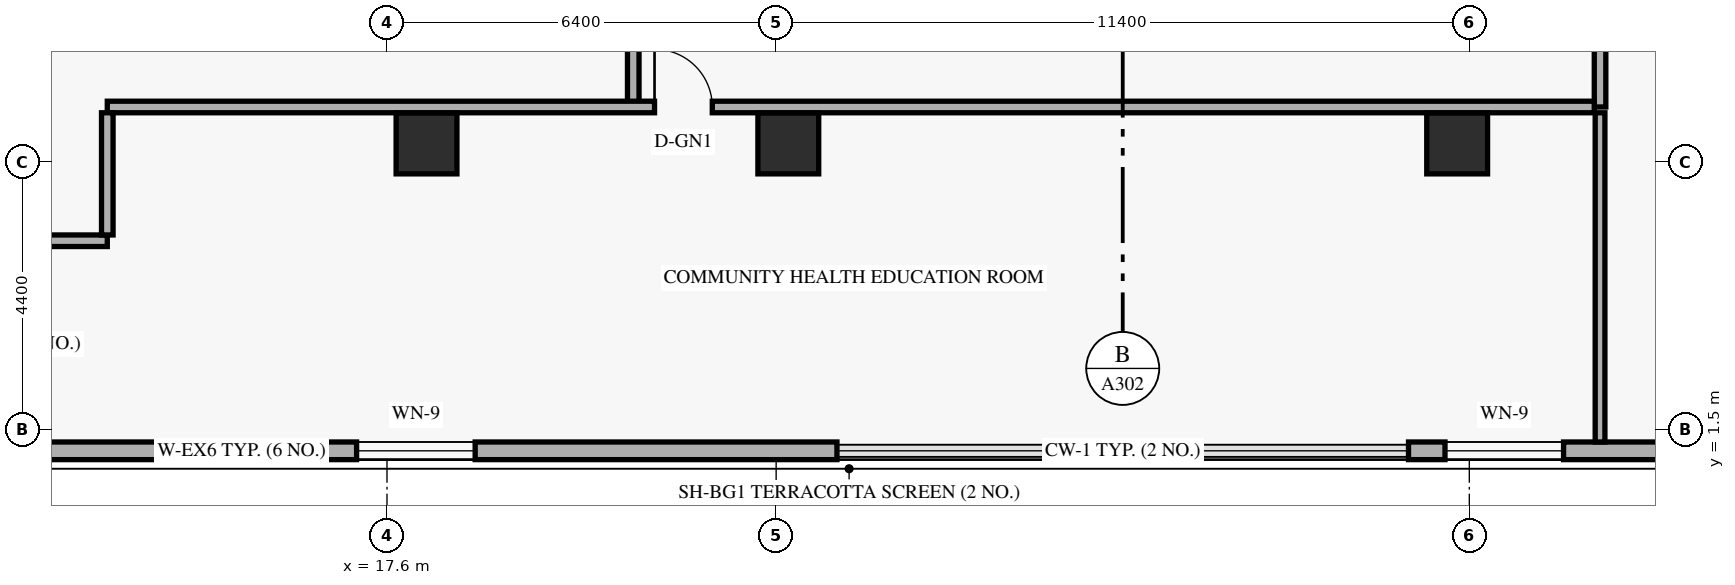
"""IFC4 building model, lengths in metres.
Left out: names, types, materials, properties, quantities, classifications, styles, units other than length and angle.
Written with IfcOpenShell. Run it as: python <this file> out.ifc"""

import sys

from ifc_helpers import new_model, si_unit, direction, frame, frame_2d, origin, origin_2d, place, context, subcontext, project, spatial, rectangle, extrude, element, fill, save


model = new_model("IFC4")
c1 = context("Model", 3, precision=1e-05, world=origin(), true_north=direction((0.0, 1.0)))
c2 = subcontext(c1, "Body", "Model", "MODEL_VIEW")
j1 = project(units=[si_unit("LENGTHUNIT", "METRE"), si_unit("PLANEANGLEUNIT", "RADIAN")], contexts=[c1])
p1 = place(None, origin())
s1 = spatial("IfcSite", under=j1, at=p1, CompositionType="ELEMENT")
p2 = place(p1, origin())
s2 = spatial("IfcBuilding", under=s1, at=p2, CompositionType="ELEMENT")
p3 = place(p2, frame((0.0, 0.0, 19.2)))
s3 = spatial("IfcBuildingStorey", under=s2, at=p3, CompositionType="ELEMENT", Elevation=19.2)
for number, where, z_axis, x_axis in (
    (1, (18.25, 6.2, 0.0), (0.0, 0.0, 1.0), (1.0, 0.0, 0.0)),
    (2, (24.2, 6.2, 0.0), (0.0, 0.0, 1.0), (1.0, 0.0, 0.0)),
    (3, (35.2, 6.2, 0.0), (0.0, 0.0, 1.0), (1.0, 0.0, 0.0)),
):
    element("IfcColumn", number, at=place(p3, frame(where, z_axis=z_axis, x_axis=x_axis)), inside=s3, PredefinedType="COLUMN", context=c2, shape_type="SweptSolid", body=[
        extrude(rectangle(XDim=1.0, YDim=1.0, at=origin_2d()), origin(), (0.0, 0.0, 1.0), 4.8),
    ])
p4 = place(p3, frame((5.42, 1.145, 0.0), z_axis=(0.0, 0.0, 1.0), x_axis=(1.0, 0.0, 0.0)))
e4 = element("IfcWall", 4, at=p4, inside=s3, PredefinedType="SOLIDWALL", context=c2, shape_type="SweptSolid", body=[
    extrude(rectangle(XDim=19.58, YDim=0.29, at=frame_2d((9.79, 0.0))), origin(), (0.0, 0.0, 1.0), 4.5),
])
p5 = place(p4, frame((1.89, 0.0, 0.85)))
e5 = element("IfcOpeningElement", 5, at=p5, cuts=e4, PredefinedType="OPENING", context=c2, shape_type="SweptSolid", body=[
    extrude(rectangle(XDim=1.95, YDim=1.75, at=frame_2d((0.975, 0.875))), frame((0.0, 0.155, 0.0), z_axis=(0.0, -1.0, 0.0), x_axis=(1.0, 0.0, 0.0)), (0.0, 0.0, 1.0), 0.31),
])
p6 = place(p4, frame((11.68, 0.0, 0.85)))
e6 = element("IfcOpeningElement", 6, at=p6, cuts=e4, PredefinedType="OPENING", context=c2, shape_type="SweptSolid", body=[
    extrude(rectangle(XDim=1.95, YDim=1.75, at=frame_2d((0.975, 0.875))), frame((0.0, 0.155, 0.0), z_axis=(0.0, -1.0, 0.0), x_axis=(1.0, 0.0, 0.0)), (0.0, 0.0, 1.0), 0.31),
])
p7 = place(p3, frame((34.4, 1.145, 0.0), z_axis=(0.0, 0.0, 1.0), x_axis=(1.0, 0.0, 0.0)))
e7 = element("IfcWall", 7, at=p7, inside=s3, PredefinedType="SOLIDWALL", context=c2, shape_type="SweptSolid", body=[
    extrude(rectangle(XDim=10.58, YDim=0.29, at=frame_2d((5.29, 0.0))), origin(), (0.0, 0.0, 1.0), 4.5),
])
p8 = place(p7, frame((0.6, 0.0, 0.85)))
e8 = element("IfcOpeningElement", 8, at=p8, cuts=e7, PredefinedType="OPENING", context=c2, shape_type="SweptSolid", body=[
    extrude(rectangle(XDim=1.95, YDim=1.75, at=frame_2d((0.975, 0.875))), frame((0.0, 0.155, 0.0), z_axis=(0.0, -1.0, 0.0), x_axis=(1.0, 0.0, 0.0)), (0.0, 0.0, 1.0), 0.31),
])
p9 = place(p7, frame((5.89, 0.0, 0.85)))
e9 = element("IfcOpeningElement", 9, at=p9, cuts=e7, PredefinedType="OPENING", context=c2, shape_type="SweptSolid", body=[
    extrude(rectangle(XDim=1.95, YDim=1.75, at=frame_2d((0.975, 0.875))), frame((0.0, 0.155, 0.0), z_axis=(0.0, -1.0, 0.0), x_axis=(1.0, 0.0, 0.0)), (0.0, 0.0, 1.0), 0.31),
])
p10 = place(p3, frame((21.65, 6.8, 0.0), z_axis=(0.0, 0.0, 1.0), x_axis=(0.0, 1.0, 0.0)))
e10 = element("IfcWall", 10, at=p10, inside=s3, PredefinedType="STANDARD", context=c2, shape_type="SweptSolid", body=[
    extrude(rectangle(XDim=34.4, YDim=0.19, at=frame_2d((17.2, 0.0))), origin(), (0.0, 0.0, 1.0), 3.555),
])
p11 = place(p10, frame((22.48, 0.0, 0.0)))
e11 = element("IfcOpeningElement", 11, at=p11, cuts=e10, PredefinedType="OPENING", context=c2, shape_type="SweptSolid", body=[
    extrude(rectangle(XDim=0.92, YDim=2.14, at=frame_2d((0.46, 1.07))), frame((0.0, 0.105, 0.0), z_axis=(0.0, -1.0, 0.0), x_axis=(1.0, 0.0, 0.0)), (0.0, 0.0, 1.0), 0.21),
])
p12 = place(p10, frame((28.2, 0.0, 0.0)))
e12 = element("IfcOpeningElement", 12, at=p12, cuts=e10, PredefinedType="OPENING", context=c2, shape_type="SweptSolid", body=[
    extrude(rectangle(XDim=0.95, YDim=2.15, at=frame_2d((0.475, 1.075))), frame((0.0, 0.105, 0.0), z_axis=(0.0, -1.0, 0.0), x_axis=(1.0, 0.0, 0.0)), (0.0, 0.0, 1.0), 0.21),
])
p13 = place(p10, frame((6.0, 0.0, 0.0)))
e13 = element("IfcOpeningElement", 13, at=p13, cuts=e10, PredefinedType="OPENING", context=c2, shape_type="SweptSolid", body=[
    extrude(rectangle(XDim=0.9, YDim=2.1, at=frame_2d((0.45, 1.05))), frame((0.0, 0.105, 0.0), z_axis=(0.0, -1.0, 0.0), x_axis=(1.0, 0.0, 0.0)), (0.0, 0.0, 1.0), 0.21),
])
p14 = place(p3, frame((37.55, 6.8, 0.0), z_axis=(0.0, 0.0, 1.0), x_axis=(0.0, 1.0, 0.0)))
e14 = element("IfcWall", 14, at=p14, inside=s3, PredefinedType="STANDARD", context=c2, shape_type="SweptSolid", body=[
    extrude(rectangle(XDim=34.4, YDim=0.19, at=frame_2d((17.2, 0.0))), origin(), (0.0, 0.0, 1.0), 3.555),
])
p15 = place(p14, frame((3.0, 0.0, 0.0)))
e15 = element("IfcOpeningElement", 15, at=p15, cuts=e14, PredefinedType="OPENING", context=c2, shape_type="SweptSolid", body=[
    extrude(rectangle(XDim=1.05, YDim=2.15, at=frame_2d((0.525, 1.075))), frame((0.0, 0.105, 0.0), z_axis=(0.0, -1.0, 0.0), x_axis=(1.0, 0.0, 0.0)), (0.0, 0.0, 1.0), 0.21),
])
p16 = place(p14, frame((19.617, 0.0, 0.0)))
e16 = element("IfcOpeningElement", 16, at=p16, cuts=e14, PredefinedType="OPENING", context=c2, shape_type="SweptSolid", body=[
    extrude(rectangle(XDim=1.2, YDim=2.15, at=frame_2d((0.6, 1.075))), frame((0.0, 0.105, 0.0), z_axis=(0.0, -1.0, 0.0), x_axis=(1.0, 0.0, 0.0)), (0.0, 0.0, 1.0), 0.21),
])
p17 = place(p14, frame((30.79, 0.0, 0.0)))
e17 = element("IfcOpeningElement", 17, at=p17, cuts=e14, PredefinedType="OPENING", context=c2, shape_type="SweptSolid", body=[
    extrude(rectangle(XDim=1.05, YDim=2.15, at=frame_2d((0.525, 1.075))), frame((0.0, 0.105, 0.0), z_axis=(0.0, -1.0, 0.0), x_axis=(1.0, 0.0, 0.0)), (0.0, 0.0, 1.0), 0.21),
])
p18 = place(p3, frame((13.0, 6.8, 0.0), z_axis=(0.0, 0.0, 1.0), x_axis=(1.0, 0.0, 0.0)))
e18 = element("IfcWall", 18, at=p18, inside=s3, PredefinedType="STANDARD", context=c2, shape_type="SweptSolid", body=[
    extrude(rectangle(XDim=24.455, YDim=0.19, at=frame_2d((12.228, 0.0))), origin(), (0.0, 0.0, 1.0), 3.712),
])
p19 = place(p18, frame((9.0, 0.0, 0.0)))
e19 = element("IfcOpeningElement", 19, at=p19, cuts=e18, PredefinedType="OPENING", context=c2, shape_type="SweptSolid", body=[
    extrude(rectangle(XDim=0.95, YDim=2.15, at=frame_2d((0.475, 1.075))), frame((0.0, 0.105, 0.0), z_axis=(0.0, -1.0, 0.0), x_axis=(1.0, 0.0, 0.0)), (0.0, 0.0, 1.0), 0.21),
])
p20 = place(p3, frame((11.15, 4.6, 0.0), z_axis=(0.0, 0.0, 1.0), x_axis=(1.0, 0.0, 0.0)))
e20 = element("IfcWall", 20, at=p20, inside=s3, PredefinedType="STANDARD", context=c2, shape_type="SweptSolid", body=[
    extrude(rectangle(XDim=1.85, YDim=0.19, at=frame_2d((0.925, 0.0))), origin(), (0.0, 0.0, 1.0), 4.5),
])
p21 = place(p3, frame((13.0, 4.695, 0.0), z_axis=(0.0, 0.0, 1.0), x_axis=(0.0, 1.0, 0.0)))
e21 = element("IfcWall", 21, at=p21, inside=s3, PredefinedType="STANDARD", context=c2, shape_type="SweptSolid", body=[
    extrude(rectangle(XDim=2.01, YDim=0.19, at=frame_2d((1.005, 0.0))), origin(), (0.0, 0.0, 1.0), 3.949),
])
p22 = place(p3, frame((37.55, 1.29, 0.0), z_axis=(0.0, 0.0, 1.0), x_axis=(0.0, 1.0, 0.0)))
e22 = element("IfcWall", 22, at=p22, inside=s3, PredefinedType="PARTITIONING", context=c2, shape_type="SweptSolid", body=[
    extrude(rectangle(XDim=5.415, YDim=0.16, at=frame_2d((2.708, 0.0))), origin(), (0.0, 0.0, 1.0), 3.949),
])
p23 = place(p6, origin())
e23 = element("IfcWindow", 23, at=p23, inside=s3, PartitioningType="SINGLE_PANEL", PredefinedType="WINDOW", context=c2, shape_type="SweptSolid", body=[
    extrude(rectangle(XDim=1.95, YDim=1.75, at=frame_2d((0.975, 0.875))), frame((0.0, 0.03, 0.0), z_axis=(0.0, -1.0, 0.0), x_axis=(1.0, 0.0, 0.0)), (0.0, 0.0, 1.0), 0.06),
])
fill(e6, e23)
p24 = place(p8, origin())
e24 = element("IfcWindow", 24, at=p24, inside=s3, PartitioningType="SINGLE_PANEL", PredefinedType="WINDOW", context=c2, shape_type="SweptSolid", body=[
    extrude(rectangle(XDim=1.95, YDim=1.75, at=frame_2d((0.975, 0.875))), frame((0.0, 0.03, 0.0), z_axis=(0.0, -1.0, 0.0), x_axis=(1.0, 0.0, 0.0)), (0.0, 0.0, 1.0), 0.06),
])
fill(e8, e24)
p25 = place(p19, origin())
e25 = element("IfcDoor", 25, at=p25, inside=s3, OperationType="SINGLE_SWING_LEFT", PredefinedType="DOOR", context=c2, shape_type="SweptSolid", body=[
    extrude(rectangle(XDim=0.95, YDim=2.15, at=frame_2d((0.475, 1.075))), frame((0.0, 0.025, 0.0), z_axis=(0.0, -1.0, 0.0), x_axis=(1.0, 0.0, 0.0)), (0.0, 0.0, 1.0), 0.05),
])
fill(e19, e25)
save(model, sys.argv[1])
